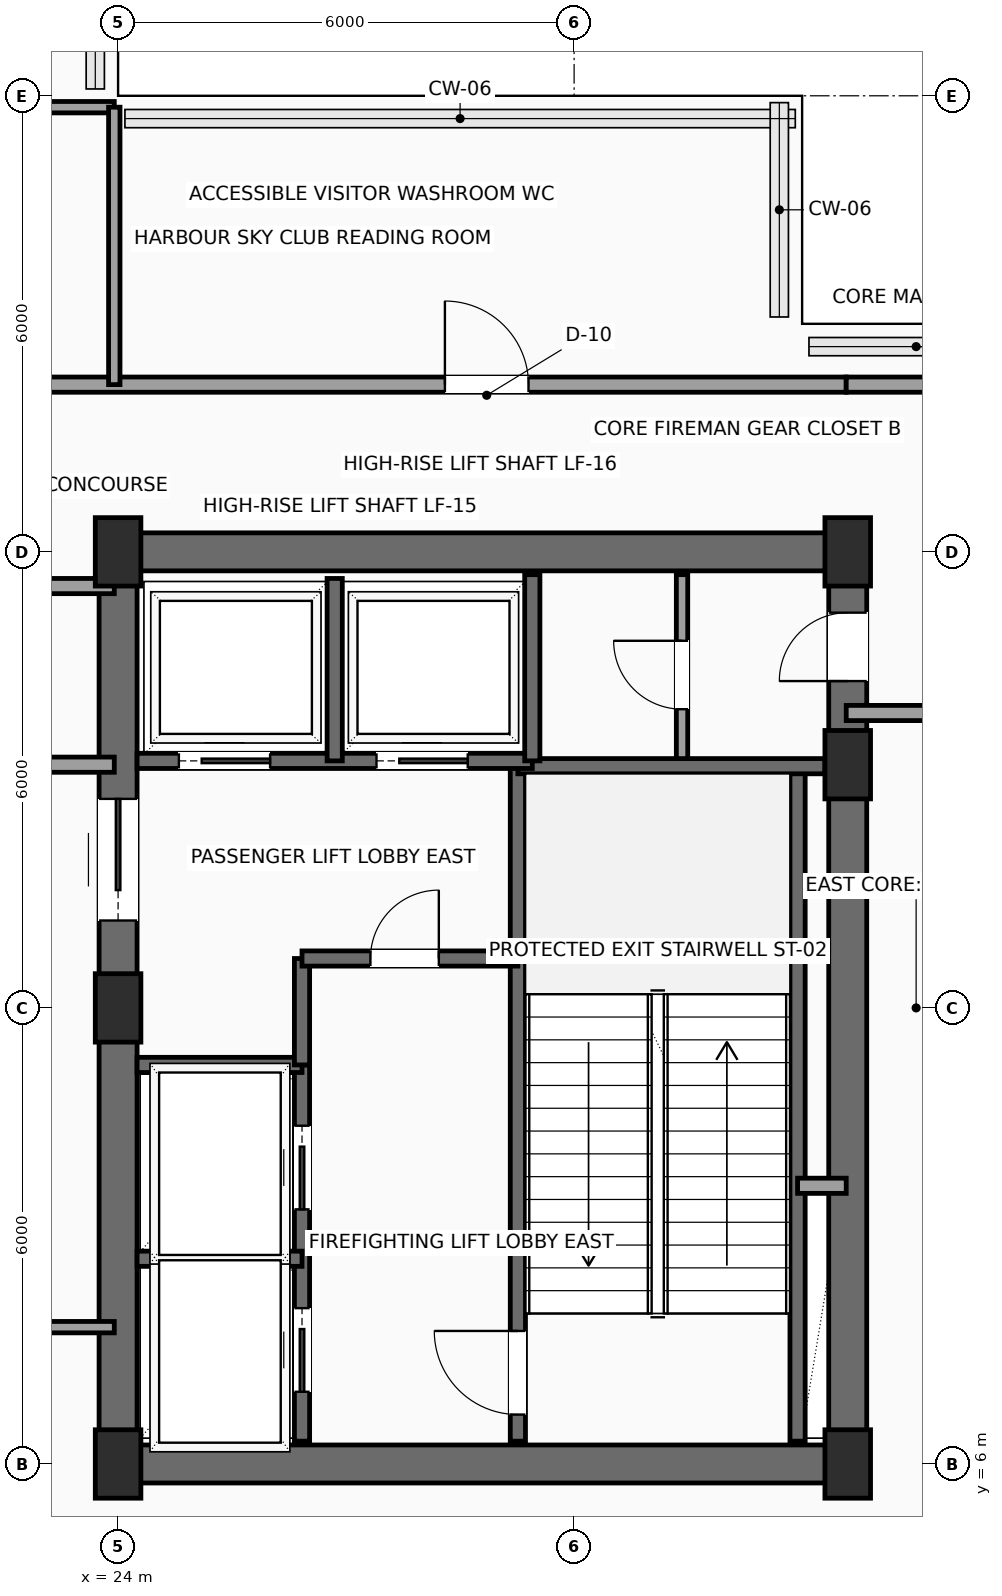
"""IFC4 building model, lengths in metres.
Left out: names, types, materials, properties, quantities, classifications, styles, units other than length and angle.
Written with IfcOpenShell. Run it as: python <this file> out.ifc"""

import sys

from ifc_helpers import new_model, si_unit, direction, frame, frame_2d, origin, origin_2d, place, context, subcontext, project, spatial, rectangle, extrude, element, fill, save


model = new_model("IFC4")
c1 = context("Model", 3, precision=1e-05, world=origin(), true_north=direction((0.0, 1.0)))
c2 = subcontext(c1, "Body", "Model", "MODEL_VIEW")
j1 = project(units=[si_unit("LENGTHUNIT", "METRE"), si_unit("PLANEANGLEUNIT", "RADIAN")], contexts=[c1])
p1 = place(None, origin())
s1 = spatial("IfcSite", under=j1, at=p1, CompositionType="ELEMENT")
p2 = place(p1, origin())
s2 = spatial("IfcBuilding", under=s1, at=p2, CompositionType="ELEMENT")
p3 = place(p2, frame((0.0, 0.0, 296.4)))
s3 = spatial("IfcBuildingStorey", under=s2, at=p3, CompositionType="ELEMENT", Elevation=296.4)
for number, where, z_axis, x_axis in (
    (1, (24.0, 6.0, 0.0), (0.0, 0.0, 1.0), (1.0, 0.0, 0.0)),
    (2, (24.0, 12.0, 0.0), (0.0, 0.0, 1.0), (1.0, 0.0, 0.0)),
    (3, (24.0, 18.0, 0.0), (0.0, 0.0, 1.0), (1.0, 0.0, 0.0)),
    (4, (33.6, 6.0, 0.0), (0.0, 0.0, 1.0), (1.0, 0.0, 0.0)),
    (5, (33.6, 15.2, 0.0), (0.0, 0.0, 1.0), (1.0, 0.0, 0.0)),
    (6, (33.6, 18.0, 0.0), (0.0, 0.0, 1.0), (1.0, 0.0, 0.0)),
):
    element("IfcColumn", number, at=place(p3, frame(where, z_axis=z_axis, x_axis=x_axis)), inside=s3, PredefinedType="COLUMN", context=c2, shape_type="SweptSolid", body=[
        extrude(rectangle(XDim=0.6, YDim=0.9, at=origin_2d()), origin(), (0.0, 0.0, 1.0), 4.5),
    ])
for number, where, z_axis, x_axis in (
    (7, (24.0, 6.0, 0.0), (0.0, 0.0, 1.0), (1.0, 0.0, 0.0)),
    (8, (24.0, 18.0, 0.0), (0.0, 0.0, 1.0), (1.0, 0.0, 0.0)),
):
    element("IfcWall", number, at=place(p3, frame(where, z_axis=z_axis, x_axis=x_axis)), inside=s3, PredefinedType="SHEAR", context=c2, shape_type="SweptSolid", body=[
        extrude(rectangle(XDim=9.6, YDim=0.5, at=frame_2d((4.8, 0.0))), origin(), (0.0, 0.0, 1.0), 4.225),
    ])
p4 = place(p3, frame((24.0, 6.0, 0.0), z_axis=(0.0, 0.0, 1.0), x_axis=(0.0, 1.0, 0.0)))
e9 = element("IfcWall", 9, at=p4, inside=s3, PredefinedType="SHEAR", context=c2, shape_type="SweptSolid", body=[
    extrude(rectangle(XDim=12.0, YDim=0.5, at=frame_2d((6.0, 0.0))), origin(), (0.0, 0.0, 1.0), 4.225),
])
p5 = place(p4, frame((7.15, 0.0, 0.0)))
e10 = element("IfcOpeningElement", 10, at=p5, cuts=e9, PredefinedType="OPENING", context=c2, shape_type="SweptSolid", body=[
    extrude(rectangle(XDim=1.6, YDim=2.3, at=frame_2d((0.8, 1.15))), frame((0.0, 0.26, 0.0), z_axis=(0.0, -1.0, 0.0), x_axis=(1.0, 0.0, 0.0)), (0.0, 0.0, 1.0), 0.52),
])
p6 = place(p3, frame((33.6, 6.0, 0.0), z_axis=(0.0, 0.0, 1.0), x_axis=(0.0, 1.0, 0.0)))
e11 = element("IfcWall", 11, at=p6, inside=s3, PredefinedType="SHEAR", context=c2, shape_type="SweptSolid", body=[
    extrude(rectangle(XDim=12.0, YDim=0.5, at=frame_2d((6.0, 0.0))), origin(), (0.0, 0.0, 1.0), 4.225),
])
p7 = place(p6, frame((10.3, 0.0, 0.0)))
e12 = element("IfcOpeningElement", 12, at=p7, cuts=e11, PredefinedType="OPENING", context=c2, shape_type="SweptSolid", body=[
    extrude(rectangle(XDim=0.9, YDim=2.15, at=frame_2d((0.45, 1.075))), frame((0.0, 0.26, 0.0), z_axis=(0.0, -1.0, 0.0), x_axis=(1.0, 0.0, 0.0)), (0.0, 0.0, 1.0), 0.52),
])
p8 = place(p3, frame((29.26, 6.3, 0.0), z_axis=(0.0, 0.0, 1.0), x_axis=(0.0, 1.0, 0.0)))
e13 = element("IfcWall", 13, at=p8, inside=s3, PredefinedType="SHEAR", context=c2, shape_type="SweptSolid", body=[
    extrude(rectangle(XDim=8.88, YDim=0.2, at=frame_2d((4.44, 0.0))), origin(), (0.0, 0.0, 1.0), 4.225),
])
p9 = place(p8, frame((0.35, 0.0, 0.0)))
e14 = element("IfcOpeningElement", 14, at=p9, cuts=e13, PredefinedType="OPENING", context=c2, shape_type="SweptSolid", body=[
    extrude(rectangle(XDim=1.1, YDim=2.2, at=frame_2d((0.55, 1.1))), frame((0.0, 0.11, 0.0), z_axis=(0.0, -1.0, 0.0), x_axis=(1.0, 0.0, 0.0)), (0.0, 0.0, 1.0), 0.22),
])
p10 = place(p3, frame((32.94, 6.3, 0.0), z_axis=(0.0, 0.0, 1.0), x_axis=(0.0, 1.0, 0.0)))
e15 = element("IfcWall", 15, at=p10, inside=s3, PredefinedType="SHEAR", context=c2, shape_type="SweptSolid", body=[
    extrude(rectangle(XDim=8.88, YDim=0.2, at=frame_2d((4.44, 0.0))), origin(), (0.0, 0.0, 1.0), 4.225),
])
p11 = place(p3, frame((29.26, 15.18, 0.0), z_axis=(0.0, 0.0, 1.0), x_axis=(1.0, 0.0, 0.0)))
e16 = element("IfcWall", 16, at=p11, inside=s3, PredefinedType="SHEAR", context=c2, shape_type="SweptSolid", body=[
    extrude(rectangle(XDim=4.04, YDim=0.2, at=frame_2d((2.02, 0.0))), origin(), (0.0, 0.0, 1.0), 4.225),
])
p12 = place(p3, frame((26.42, 6.3, 0.0), z_axis=(0.0, 0.0, 1.0), x_axis=(0.0, 1.0, 0.0)))
e17 = element("IfcWall", 17, at=p12, inside=s3, PredefinedType="SHEAR", context=c2, shape_type="SweptSolid", body=[
    extrude(rectangle(XDim=4.95, YDim=0.2, at=frame_2d((2.475, 0.0))), origin(), (0.0, 0.0, 1.0), 4.225),
])
p13 = place(p12, frame((0.65, 0.0, 0.0)))
e18 = element("IfcOpeningElement", 18, at=p13, cuts=e17, PredefinedType="OPENING", context=c2, shape_type="SweptSolid", body=[
    extrude(rectangle(XDim=1.1, YDim=2.2, at=frame_2d((0.55, 1.1))), frame((0.0, 0.11, 0.0), z_axis=(0.0, -1.0, 0.0), x_axis=(1.0, 0.0, 0.0)), (0.0, 0.0, 1.0), 0.22),
])
p14 = place(p12, frame((3.05, 0.0, 0.0)))
e19 = element("IfcOpeningElement", 19, at=p14, cuts=e17, PredefinedType="OPENING", context=c2, shape_type="SweptSolid", body=[
    extrude(rectangle(XDim=1.1, YDim=2.2, at=frame_2d((0.55, 1.1))), frame((0.0, 0.11, 0.0), z_axis=(0.0, -1.0, 0.0), x_axis=(1.0, 0.0, 0.0)), (0.0, 0.0, 1.0), 0.22),
])
for number, where, z_axis, x_axis in (
    (20, (24.25, 8.7, 0.0), (0.0, 0.0, 1.0), (1.0, 0.0, 0.0)),
    (21, (24.25, 11.25, 0.0), (0.0, 0.0, 1.0), (1.0, 0.0, 0.0)),
):
    element("IfcWall", number, at=place(p3, frame(where, z_axis=z_axis, x_axis=x_axis)), inside=s3, PredefinedType="SHEAR", context=c2, shape_type="SweptSolid", body=[
        extrude(rectangle(XDim=2.17, YDim=0.2, at=frame_2d((1.085, 0.0))), origin(), (0.0, 0.0, 1.0), 4.225),
    ])
p15 = place(p3, frame((26.42, 11.25, 0.0), z_axis=(0.0, 0.0, 1.0), x_axis=(0.0, 1.0, 0.0)))
e22 = element("IfcWall", 22, at=p15, inside=s3, PredefinedType="SHEAR", context=c2, shape_type="SweptSolid", body=[
    extrude(rectangle(XDim=1.4, YDim=0.2, at=frame_2d((0.7, 0.0))), origin(), (0.0, 0.0, 1.0), 4.225),
])
p16 = place(p3, frame((26.42, 12.65, 0.0), z_axis=(0.0, 0.0, 1.0), x_axis=(1.0, 0.0, 0.0)))
e23 = element("IfcWall", 23, at=p16, inside=s3, PredefinedType="SHEAR", context=c2, shape_type="SweptSolid", body=[
    extrude(rectangle(XDim=2.84, YDim=0.2, at=frame_2d((1.42, 0.0))), origin(), (0.0, 0.0, 1.0), 4.225),
])
p17 = place(p16, frame((0.9, 0.0, 0.0)))
e24 = element("IfcOpeningElement", 24, at=p17, cuts=e23, PredefinedType="OPENING", context=c2, shape_type="SweptSolid", body=[
    extrude(rectangle(XDim=0.9, YDim=2.15, at=frame_2d((0.45, 1.075))), frame((0.0, 0.11, 0.0), z_axis=(0.0, -1.0, 0.0), x_axis=(1.0, 0.0, 0.0)), (0.0, 0.0, 1.0), 0.22),
])
p18 = place(p3, frame((32.94, 9.66, 0.0), z_axis=(0.0, 0.0, 1.0), x_axis=(1.0, 0.0, 0.0)))
e25 = element("IfcWall", 25, at=p18, inside=s3, PredefinedType="SOLIDWALL", context=c2, shape_type="SweptSolid", body=[
    extrude(rectangle(XDim=0.64, YDim=0.2, at=frame_2d((0.32, 0.0))), origin(), (0.0, 0.0, 1.0), 4.225),
])
p19 = place(p3, frame((24.25, 15.25, 0.0), z_axis=(0.0, 0.0, 1.0), x_axis=(1.0, 0.0, 0.0)))
e26 = element("IfcWall", 26, at=p19, inside=s3, PredefinedType="SHEAR", context=c2, shape_type="SweptSolid", body=[
    extrude(rectangle(XDim=5.2, YDim=0.2, at=frame_2d((2.6, 0.0))), origin(), (0.0, 0.0, 1.0), 4.225),
])
p20 = place(p19, frame((0.55, 0.0, 0.0)))
e27 = element("IfcOpeningElement", 27, at=p20, cuts=e26, PredefinedType="OPENING", context=c2, shape_type="SweptSolid", body=[
    extrude(rectangle(XDim=1.2, YDim=2.2, at=frame_2d((0.6, 1.1))), frame((0.0, 0.11, 0.0), z_axis=(0.0, -1.0, 0.0), x_axis=(1.0, 0.0, 0.0)), (0.0, 0.0, 1.0), 0.22),
])
p21 = place(p19, frame((3.15, 0.0, 0.0)))
e28 = element("IfcOpeningElement", 28, at=p21, cuts=e26, PredefinedType="OPENING", context=c2, shape_type="SweptSolid", body=[
    extrude(rectangle(XDim=1.2, YDim=2.2, at=frame_2d((0.6, 1.1))), frame((0.0, 0.11, 0.0), z_axis=(0.0, -1.0, 0.0), x_axis=(1.0, 0.0, 0.0)), (0.0, 0.0, 1.0), 0.22),
])
p22 = place(p3, frame((26.85, 15.25, 0.0), z_axis=(0.0, 0.0, 1.0), x_axis=(0.0, 1.0, 0.0)))
e29 = element("IfcWall", 29, at=p22, inside=s3, PredefinedType="SHEAR", context=c2, shape_type="SweptSolid", body=[
    extrude(rectangle(XDim=2.4, YDim=0.2, at=frame_2d((1.2, 0.0))), origin(), (0.0, 0.0, 1.0), 4.225),
])
p23 = place(p3, frame((29.45, 15.25, 0.0), z_axis=(0.0, 0.0, 1.0), x_axis=(0.0, 1.0, 0.0)))
e30 = element("IfcWall", 30, at=p23, inside=s3, PredefinedType="SHEAR", context=c2, shape_type="SweptSolid", body=[
    extrude(rectangle(XDim=2.45, YDim=0.2, at=frame_2d((1.225, 0.0))), origin(), (0.0, 0.0, 1.0), 4.225),
])
p24 = place(p3, frame((31.42, 15.28, 0.0), z_axis=(0.0, 0.0, 1.0), x_axis=(0.0, 1.0, 0.0)))
e31 = element("IfcWall", 31, at=p24, inside=s3, PredefinedType="PARTITIONING", context=c2, shape_type="SweptSolid", body=[
    extrude(rectangle(XDim=2.42, YDim=0.15, at=frame_2d((1.21, 0.0))), origin(), (0.0, 0.0, 1.0), 4.225),
])
p25 = place(p24, frame((0.65, 0.0, 0.0)))
e32 = element("IfcOpeningElement", 32, at=p25, cuts=e31, PredefinedType="OPENING", context=c2, shape_type="SweptSolid", body=[
    extrude(rectangle(XDim=0.9, YDim=2.15, at=frame_2d((0.45, 1.075))), frame((0.0, 0.085, 0.0), z_axis=(0.0, -1.0, 0.0), x_axis=(1.0, 0.0, 0.0)), (0.0, 0.0, 1.0), 0.17),
])
p26 = place(p3, frame((20.45, 20.2, 0.0), z_axis=(0.0, 0.0, 1.0), x_axis=(1.0, 0.0, 0.0)))
e33 = element("IfcWall", 33, at=p26, inside=s3, PredefinedType="SOLIDWALL", context=c2, shape_type="SweptSolid", body=[
    extrude(rectangle(XDim=13.13, YDim=0.2, at=frame_2d((6.565, 0.0))), origin(), (0.0, 0.0, 1.0), 4.225),
])
p27 = place(p26, frame((7.85, 0.0, 0.0)))
e34 = element("IfcOpeningElement", 34, at=p27, cuts=e33, PredefinedType="OPENING", context=c2, shape_type="SweptSolid", body=[
    extrude(rectangle(XDim=1.1, YDim=2.25, at=frame_2d((0.55, 1.125))), frame((0.0, 0.11, 0.0), z_axis=(0.0, -1.0, 0.0), x_axis=(1.0, 0.0, 0.0)), (0.0, 0.0, 1.0), 0.22),
])
for number, where, z_axis, x_axis in (
    (35, (33.58, 20.2, 0.0), (0.0, 0.0, 1.0), (1.0, 0.0, 0.0)),
    (36, (35.7, 15.88, 0.0), (0.0, 0.0, 1.0), (-1.0, 0.0, 0.0)),
):
    element("IfcWall", number, at=place(p3, frame(where, z_axis=z_axis, x_axis=x_axis)), inside=s3, PredefinedType="SOLIDWALL", context=c2, shape_type="SweptSolid", body=[
        extrude(rectangle(XDim=2.12, YDim=0.2, at=frame_2d((1.06, 0.0))), origin(), (0.0, 0.0, 1.0), 4.225),
    ])
p28 = place(p3, frame((20.45, 17.55, 0.0), z_axis=(0.0, 0.0, 1.0), x_axis=(1.0, 0.0, 0.0)))
e37 = element("IfcWall", 37, at=p28, inside=s3, PredefinedType="SOLIDWALL", context=c2, shape_type="SweptSolid", body=[
    extrude(rectangle(XDim=3.5, YDim=0.2, at=frame_2d((1.75, 0.0))), origin(), (0.0, 0.0, 1.0), 4.225),
])
p29 = place(p3, frame((23.95, 15.2, 0.0), z_axis=(0.0, 0.0, 1.0), x_axis=(-1.0, 0.0, 0.0)))
e38 = element("IfcWall", 38, at=p29, inside=s3, PredefinedType="SOLIDWALL", context=c2, shape_type="SweptSolid", body=[
    extrude(rectangle(XDim=9.0, YDim=0.2, at=frame_2d((4.5, 0.0))), origin(), (0.0, 0.0, 1.0), 3.857),
])
p30 = place(p3, frame((20.45, 23.85, 0.0), z_axis=(0.0, 0.0, 1.0), x_axis=(1.0, 0.0, 0.0)))
e39 = element("IfcWall", 39, at=p30, inside=s3, PredefinedType="PARTITIONING", context=c2, shape_type="SweptSolid", body=[
    extrude(rectangle(XDim=3.5, YDim=0.15, at=frame_2d((1.75, 0.0))), origin(), (0.0, 0.0, 1.0), 4.225),
])
p31 = place(p3, frame((23.95, 20.2, 0.0), z_axis=(0.0, 0.0, 1.0), x_axis=(0.0, 1.0, 0.0)))
e40 = element("IfcWall", 40, at=p31, inside=s3, PredefinedType="PARTITIONING", context=c2, shape_type="SweptSolid", body=[
    extrude(rectangle(XDim=3.65, YDim=0.15, at=frame_2d((1.825, 0.0))), origin(), (0.0, 0.0, 1.0), 4.225),
])
p32 = place(p3, frame((14.95, 7.8, 0.0), z_axis=(0.0, 0.0, 1.0), x_axis=(1.0, 0.0, 0.0)))
e41 = element("IfcWall", 41, at=p32, inside=s3, PredefinedType="PARTITIONING", context=c2, shape_type="SweptSolid", body=[
    extrude(rectangle(XDim=9.0, YDim=0.15, at=frame_2d((4.5, 0.0))), origin(), (0.0, 0.0, 1.0), 4.225),
])
p33 = place(p5, origin())
e42 = element("IfcDoor", 42, at=p33, inside=s3, OperationType="DOUBLE_DOOR_SLIDING", PredefinedType="DOOR", context=c2, shape_type="SweptSolid", body=[
    extrude(rectangle(XDim=1.6, YDim=2.3, at=frame_2d((0.8, 1.15))), frame((0.0, 0.025, 0.0), z_axis=(0.0, -1.0, 0.0), x_axis=(1.0, 0.0, 0.0)), (0.0, 0.0, 1.0), 0.05),
])
fill(e10, e42)
p34 = place(p7, origin())
e43 = element("IfcDoor", 43, at=p34, inside=s3, OperationType="SINGLE_SWING_LEFT", PredefinedType="DOOR", context=c2, shape_type="SweptSolid", body=[
    extrude(rectangle(XDim=0.9, YDim=2.15, at=frame_2d((0.45, 1.075))), frame((0.0, 0.025, 0.0), z_axis=(0.0, -1.0, 0.0), x_axis=(1.0, 0.0, 0.0)), (0.0, 0.0, 1.0), 0.05),
])
fill(e12, e43)
p35 = place(p9, origin())
e44 = element("IfcDoor", 44, at=p35, inside=s3, OperationType="SINGLE_SWING_RIGHT", PredefinedType="DOOR", context=c2, shape_type="SweptSolid", body=[
    extrude(rectangle(XDim=1.1, YDim=2.2, at=frame_2d((0.55, 1.1))), frame((0.0, 0.025, 0.0), z_axis=(0.0, -1.0, 0.0), x_axis=(1.0, 0.0, 0.0)), (0.0, 0.0, 1.0), 0.05),
])
fill(e14, e44)
p36 = place(p13, origin())
e45 = element("IfcDoor", 45, at=p36, inside=s3, OperationType="SLIDING_TO_LEFT", PredefinedType="DOOR", context=c2, shape_type="SweptSolid", body=[
    extrude(rectangle(XDim=1.1, YDim=2.2, at=frame_2d((0.55, 1.1))), frame((0.0, 0.025, 0.0), z_axis=(0.0, -1.0, 0.0), x_axis=(1.0, 0.0, 0.0)), (0.0, 0.0, 1.0), 0.05),
])
fill(e18, e45)
p37 = place(p14, origin())
e46 = element("IfcDoor", 46, at=p37, inside=s3, OperationType="SLIDING_TO_LEFT", PredefinedType="DOOR", context=c2, shape_type="SweptSolid", body=[
    extrude(rectangle(XDim=1.1, YDim=2.2, at=frame_2d((0.55, 1.1))), frame((0.0, 0.025, 0.0), z_axis=(0.0, -1.0, 0.0), x_axis=(1.0, 0.0, 0.0)), (0.0, 0.0, 1.0), 0.05),
])
fill(e19, e46)
p38 = place(p17, origin())
e47 = element("IfcDoor", 47, at=p38, inside=s3, OperationType="SINGLE_SWING_RIGHT", PredefinedType="DOOR", context=c2, shape_type="SweptSolid", body=[
    extrude(rectangle(XDim=0.9, YDim=2.15, at=frame_2d((0.45, 1.075))), frame((0.0, 0.025, 0.0), z_axis=(0.0, -1.0, 0.0), x_axis=(1.0, 0.0, 0.0)), (0.0, 0.0, 1.0), 0.05),
])
fill(e24, e47)
p39 = place(p20, origin())
e48 = element("IfcDoor", 48, at=p39, inside=s3, OperationType="SLIDING_TO_RIGHT", PredefinedType="DOOR", context=c2, shape_type="SweptSolid", body=[
    extrude(rectangle(XDim=1.2, YDim=2.2, at=frame_2d((0.6, 1.1))), frame((0.0, 0.025, 0.0), z_axis=(0.0, -1.0, 0.0), x_axis=(1.0, 0.0, 0.0)), (0.0, 0.0, 1.0), 0.05),
])
fill(e27, e48)
p40 = place(p21, origin())
e49 = element("IfcDoor", 49, at=p40, inside=s3, OperationType="SLIDING_TO_RIGHT", PredefinedType="DOOR", context=c2, shape_type="SweptSolid", body=[
    extrude(rectangle(XDim=1.2, YDim=2.2, at=frame_2d((0.6, 1.1))), frame((0.0, 0.025, 0.0), z_axis=(0.0, -1.0, 0.0), x_axis=(1.0, 0.0, 0.0)), (0.0, 0.0, 1.0), 0.05),
])
fill(e28, e49)
p41 = place(p25, origin())
e50 = element("IfcDoor", 50, at=p41, inside=s3, OperationType="SINGLE_SWING_RIGHT", PredefinedType="DOOR", context=c2, shape_type="SweptSolid", body=[
    extrude(rectangle(XDim=0.9, YDim=2.15, at=frame_2d((0.45, 1.075))), frame((0.0, 0.025, 0.0), z_axis=(0.0, -1.0, 0.0), x_axis=(1.0, 0.0, 0.0)), (0.0, 0.0, 1.0), 0.05),
])
fill(e32, e50)
p42 = place(p27, origin())
e51 = element("IfcDoor", 51, at=p42, inside=s3, OperationType="SINGLE_SWING_LEFT", PredefinedType="DOOR", context=c2, shape_type="SweptSolid", body=[
    extrude(rectangle(XDim=1.1, YDim=2.25, at=frame_2d((0.55, 1.125))), frame((0.0, 0.025, 0.0), z_axis=(0.0, -1.0, 0.0), x_axis=(1.0, 0.0, 0.0)), (0.0, 0.0, 1.0), 0.05),
])
fill(e34, e51)
save(model, sys.argv[1])
